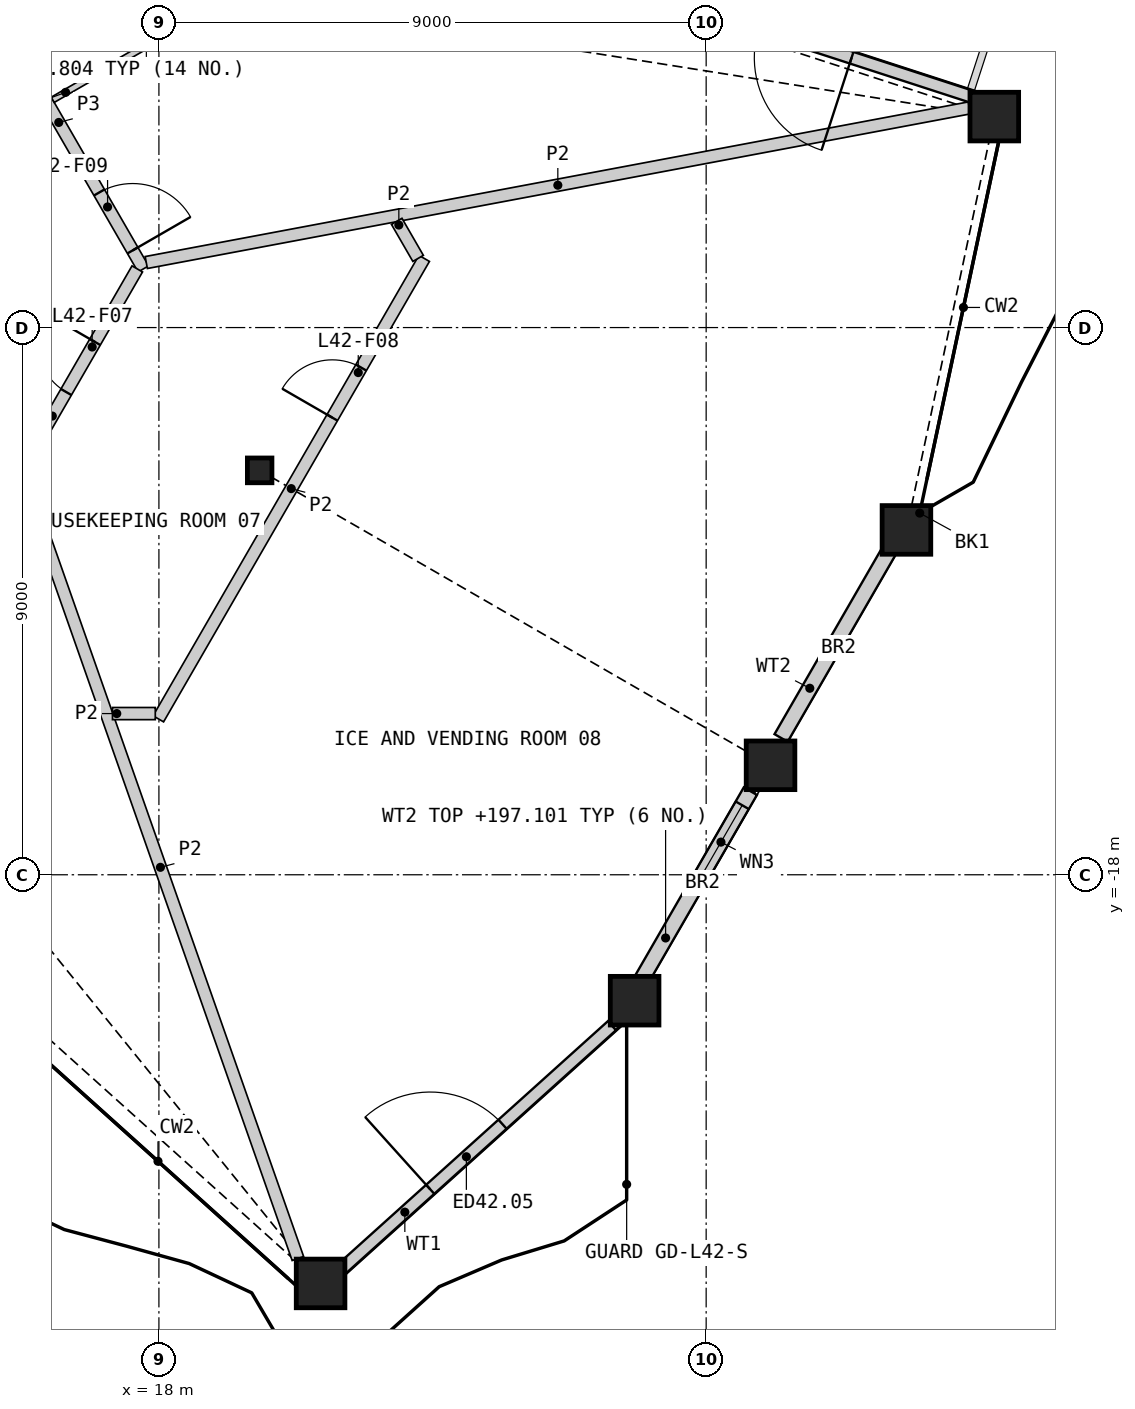
"""IFC4 building model, lengths in metres.
Left out: names, types, materials, properties, quantities, classifications, styles, units other than length and angle.
Written with IfcOpenShell. Run it as: python <this file> out.ifc"""

import sys

from ifc_helpers import new_model, si_unit, direction, frame, frame_2d, origin, origin_2d, place, context, subcontext, project, spatial, rectangle, hollow_rectangle, i_section, extrude, element, fill, save


model = new_model("IFC4")
c1 = context("Model", 3, precision=1e-05, world=origin(), true_north=direction((0.0, 1.0)))
c2 = subcontext(c1, "Body", "Model", "MODEL_VIEW")
j1 = project(units=[si_unit("LENGTHUNIT", "METRE"), si_unit("PLANEANGLEUNIT", "RADIAN")], contexts=[c1])
p1 = place(None, origin())
s1 = spatial("IfcSite", under=j1, at=p1, CompositionType="ELEMENT")
p2 = place(p1, origin())
s2 = spatial("IfcBuilding", under=s1, at=p2, CompositionType="ELEMENT")
p3 = place(p2, frame((0.0, 0.0, 194.4)))
s3 = spatial("IfcBuildingStorey", under=s2, at=p3, CompositionType="ELEMENT", Elevation=194.4)
for number, where, z_axis, x_axis in (
    (1, (20.659, -24.722, 0.0), (0.0, 0.0, 1.0), (1.0, 0.0, 0.0)),
    (2, (25.823, -20.071, 0.0), (0.0, 0.0, 1.0), (1.0, 0.0, 0.0)),
    (3, (28.059, -16.2, 0.0), (0.0, 0.0, 1.0), (1.0, 0.0, 0.0)),
    (4, (30.294, -12.328, 0.0), (0.0, 0.0, 1.0), (1.0, 0.0, 0.0)),
    (5, (31.739, -5.53, 0.0), (0.0, 0.0, 1.0), (1.0, 0.0, 0.0)),
):
    element("IfcColumn", number, at=place(p3, frame(where, z_axis=z_axis, x_axis=x_axis)), inside=s3, PredefinedType="COLUMN", context=c2, shape_type="SweptSolid", body=[
        extrude(hollow_rectangle(XDim=0.8, YDim=0.8, WallThickness=0.05, at=origin_2d()), origin(), (0.0, 0.0, 1.0), 3.6),
    ])
p4 = place(p3, frame((19.657, -11.349, 0.0), z_axis=(0.0, 0.0, 1.0), x_axis=(1.0, 0.0, 0.0)))
e6 = element("IfcColumn", 6, at=p4, inside=s3, PredefinedType="COLUMN", context=c2, shape_type="SweptSolid", body=[
    extrude(i_section(OverallWidth=0.404, OverallDepth=0.407, WebThickness=0.027, FlangeThickness=0.044, at=origin_2d()), origin(), (0.0, 0.0, 1.0), 3.6),
])
p5 = place(p3, frame((20.909, -24.571, 0.0), z_axis=(0.0, 0.0, 1.0), x_axis=(0.743153082589, 0.669121435794, 0.0)))
e7 = element("IfcWall", 7, at=p5, inside=s3, PredefinedType="SOLIDWALL", context=c2, shape_type="SweptSolid", body=[
    extrude(rectangle(XDim=6.111, YDim=0.2, at=frame_2d((3.055, 0.0))), origin(), (0.0, 0.0, 1.0), 2.701),
])
p6 = place(p5, frame((2.089, 0.0, 0.0)))
e8 = element("IfcOpeningElement", 8, at=p6, cuts=e7, PredefinedType="OPENING", context=c2, shape_type="SweptSolid", body=[
    extrude(rectangle(XDim=1.6, YDim=2.4, at=frame_2d((0.8, 1.2))), frame((0.0, 0.11, 0.0), z_axis=(0.0, -1.0, 0.0), x_axis=(1.0, 0.0, 0.0)), (0.0, 0.0, 1.0), 0.22),
])
p7 = place(p3, frame((25.868, -19.844, 0.0), z_axis=(0.0, 0.0, 1.0), x_axis=(0.499995303914, 0.866028115054, 0.0)))
e9 = element("IfcWall", 9, at=p7, inside=s3, PredefinedType="SOLIDWALL", context=c2, shape_type="SweptSolid", body=[
    extrude(rectangle(XDim=3.718, YDim=0.25, at=frame_2d((1.859, 0.0))), origin(), (0.0, 0.0, 1.0), 2.701),
])
p8 = place(p7, frame((2.05, 0.0, 1.7)))
e10 = element("IfcOpeningElement", 10, at=p8, cuts=e9, PredefinedType="OPENING", context=c2, shape_type="SweptSolid", body=[
    extrude(rectangle(XDim=1.4, YDim=0.8, at=frame_2d((0.7, 0.4))), frame((0.0, 0.135, 0.0), z_axis=(0.0, -1.0, 0.0), x_axis=(1.0, 0.0, 0.0)), (0.0, 0.0, 1.0), 0.27),
])
p9 = place(p3, frame((28.232, -15.75, 0.0), z_axis=(0.0, 0.0, 1.0), x_axis=(0.500034075199, 0.866005729565, 0.0)))
e11 = element("IfcWall", 11, at=p9, inside=s3, PredefinedType="SOLIDWALL", context=c2, shape_type="SweptSolid", body=[
    extrude(rectangle(XDim=3.775, YDim=0.25, at=frame_2d((1.888, 0.0))), origin(), (0.0, 0.0, 1.0), 2.701),
])
p10 = place(p3, frame((31.379, -5.207, 0.0), z_axis=(0.0, 0.0, 1.0), x_axis=(-0.951059550827, 0.30900765489, 0.0)))
e12 = element("IfcWall", 12, at=p10, inside=s3, PredefinedType="SOLIDWALL", context=c2, shape_type="SweptSolid", body=[
    extrude(rectangle(XDim=6.125, YDim=0.2, at=frame_2d((3.062, 0.0))), origin(), (0.0, 0.0, 1.0), 2.701),
])
p11 = place(p10, frame((2.089, 0.0, 0.0)))
e13 = element("IfcOpeningElement", 13, at=p11, cuts=e12, PredefinedType="OPENING", context=c2, shape_type="SweptSolid", body=[
    extrude(rectangle(XDim=1.6, YDim=2.4, at=frame_2d((0.8, 1.2))), frame((0.0, 0.11, 0.0), z_axis=(0.0, -1.0, 0.0), x_axis=(1.0, 0.0, 0.0)), (0.0, 0.0, 1.0), 0.22),
])
p12 = place(p3, frame((14.962, -3.217, 0.0), z_axis=(0.0, 0.0, 1.0), x_axis=(0.500013660489, -0.866017516754, 0.0)))
e14 = element("IfcWall", 14, at=p12, inside=s3, PredefinedType="PARTITIONING", context=c2, shape_type="SweptSolid", body=[
    extrude(rectangle(XDim=5.564, YDim=0.2, at=frame_2d((2.782, 0.0))), origin(), (0.0, 0.0, 1.0), 3.25),
])
p13 = place(p12, frame((4.112, 0.0, 0.0)))
e15 = element("IfcOpeningElement", 15, at=p13, cuts=e14, PredefinedType="OPENING", context=c2, shape_type="SweptSolid", body=[
    extrude(rectangle(XDim=1.1, YDim=2.1, at=frame_2d((0.55, 1.05))), frame((0.0, 0.11, 0.0), z_axis=(0.0, -1.0, 0.0), x_axis=(1.0, 0.0, 0.0)), (0.0, 0.0, 1.0), 0.22),
])
p14 = place(p3, frame((15.781, -11.262, 0.0), z_axis=(0.0, 0.0, 1.0), x_axis=(0.499958791762, 0.866049194065, 0.0)))
e16 = element("IfcWall", 16, at=p14, inside=s3, PredefinedType="PARTITIONING", context=c2, shape_type="SweptSolid", body=[
    extrude(rectangle(XDim=3.726, YDim=0.2, at=frame_2d((1.863, 0.0))), origin(), (0.0, 0.0, 1.0), 3.25),
])
p15 = place(p14, frame((1.388, 0.0, 0.0)))
e17 = element("IfcOpeningElement", 17, at=p15, cuts=e16, PredefinedType="OPENING", context=c2, shape_type="SweptSolid", body=[
    extrude(rectangle(XDim=0.95, YDim=2.1, at=frame_2d((0.475, 1.05))), frame((0.0, 0.11, 0.0), z_axis=(0.0, -1.0, 0.0), x_axis=(1.0, 0.0, 0.0)), (0.0, 0.0, 1.0), 0.22),
])
p16 = place(p3, frame((17.792, -7.93, 0.0), z_axis=(0.0, 0.0, 1.0), x_axis=(0.982805703999, 0.184642758284, 0.0)))
e18 = element("IfcWall", 18, at=p16, inside=s3, PredefinedType="PARTITIONING", context=c2, shape_type="SweptSolid", body=[
    extrude(rectangle(XDim=13.774, YDim=0.2, at=frame_2d((6.887, 0.0))), origin(), (0.0, 0.0, 1.0), 2.404),
])
p17 = place(p3, frame((15.764, -11.443, 0.0), z_axis=(0.0, 0.0, 1.0), x_axis=(0.331517429591, -0.943449094481, 0.0)))
e19 = element("IfcWall", 19, at=p17, inside=s3, PredefinedType="PARTITIONING", context=c2, shape_type="SweptSolid", body=[
    extrude(rectangle(XDim=13.639, YDim=0.2, at=frame_2d((6.82, 0.0))), origin(), (0.0, 0.0, 1.0), 2.404),
])
p18 = place(p3, frame((17.99, -15.436, 0.0), z_axis=(0.0, 0.0, 1.0), x_axis=(0.500012451049, 0.866018215049, 0.0)))
e20 = element("IfcWall", 20, at=p18, inside=s3, PredefinedType="PARTITIONING", context=c2, shape_type="SweptSolid", body=[
    extrude(rectangle(XDim=8.745, YDim=0.2, at=frame_2d((4.373, 0.0))), origin(), (0.0, 0.0, 1.0), 2.404),
])
p19 = place(p18, frame((5.721, 0.0, 0.0)))
e21 = element("IfcOpeningElement", 21, at=p19, cuts=e20, PredefinedType="OPENING", context=c2, shape_type="SweptSolid", body=[
    extrude(rectangle(XDim=0.95, YDim=2.1, at=frame_2d((0.475, 1.05))), frame((0.0, 0.11, 0.0), z_axis=(0.0, -1.0, 0.0), x_axis=(1.0, 0.0, 0.0)), (0.0, 0.0, 1.0), 0.22),
])
for number, where, z_axis, x_axis in (
    (22, (17.236, -15.349, 0.0), (0.0, 0.0, 1.0), (1.0, 0.0, 0.0)),
    (23, (21.911, -7.253, 0.0), (0.0, 0.0, 1.0), (0.5, -0.866, 0.0)),
):
    element("IfcWall", number, at=place(p3, frame(where, z_axis=z_axis, x_axis=x_axis)), inside=s3, PredefinedType="PARTITIONING", context=c2, shape_type="SweptSolid", body=[
        extrude(rectangle(XDim=0.704, YDim=0.2, at=frame_2d((0.352, 0.0))), origin(), (0.0, 0.0, 1.0), 2.404),
    ])
p20 = place(p3, frame((16.254, -5.254, 0.0), z_axis=(0.0, 0.0, 1.0), x_axis=(0.866032905446, 0.499987006516, 0.0)))
e24 = element("IfcWall", 24, at=p20, inside=s3, PredefinedType="PARTITIONING", context=c2, shape_type="SweptSolid", body=[
    extrude(rectangle(XDim=2.45, YDim=0.1, at=frame_2d((1.225, 0.0))), origin(), (0.0, 0.0, 1.0), 2.404),
])
p21 = place(p6, origin())
e25 = element("IfcDoor", 25, at=p21, inside=s3, OperationType="DOUBLE_DOOR_SINGLE_SWING", PredefinedType="DOOR", context=c2, shape_type="SweptSolid", body=[
    extrude(rectangle(XDim=1.6, YDim=2.4, at=frame_2d((0.8, 1.2))), frame((0.0, 0.025, 0.0), z_axis=(0.0, -1.0, 0.0), x_axis=(1.0, 0.0, 0.0)), (0.0, 0.0, 1.0), 0.05),
])
fill(e8, e25)
p22 = place(p8, origin())
e26 = element("IfcWindow", 26, at=p22, inside=s3, PartitioningType="SINGLE_PANEL", PredefinedType="WINDOW", context=c2, shape_type="SweptSolid", body=[
    extrude(rectangle(XDim=1.4, YDim=0.8, at=frame_2d((0.7, 0.4))), frame((0.0, 0.03, 0.0), z_axis=(0.0, -1.0, 0.0), x_axis=(1.0, 0.0, 0.0)), (0.0, 0.0, 1.0), 0.06),
])
fill(e10, e26)
p23 = place(p11, origin())
e27 = element("IfcDoor", 27, at=p23, inside=s3, OperationType="DOUBLE_DOOR_SINGLE_SWING", PredefinedType="DOOR", context=c2, shape_type="SweptSolid", body=[
    extrude(rectangle(XDim=1.6, YDim=2.4, at=frame_2d((0.8, 1.2))), frame((0.0, 0.025, 0.0), z_axis=(0.0, -1.0, 0.0), x_axis=(1.0, 0.0, 0.0)), (0.0, 0.0, 1.0), 0.05),
])
fill(e13, e27)
p24 = place(p15, origin())
e28 = element("IfcDoor", 28, at=p24, inside=s3, OperationType="SINGLE_SWING_RIGHT", PredefinedType="DOOR", context=c2, shape_type="SweptSolid", body=[
    extrude(rectangle(XDim=0.95, YDim=2.1, at=frame_2d((0.475, 1.05))), frame((0.0, 0.025, 0.0), z_axis=(0.0, -1.0, 0.0), x_axis=(1.0, 0.0, 0.0)), (0.0, 0.0, 1.0), 0.05),
])
fill(e17, e28)
p25 = place(p19, origin())
e29 = element("IfcDoor", 29, at=p25, inside=s3, OperationType="SINGLE_SWING_LEFT", PredefinedType="DOOR", context=c2, shape_type="SweptSolid", body=[
    extrude(rectangle(XDim=0.95, YDim=2.1, at=frame_2d((0.475, 1.05))), frame((0.0, 0.025, 0.0), z_axis=(0.0, -1.0, 0.0), x_axis=(1.0, 0.0, 0.0)), (0.0, 0.0, 1.0), 0.05),
])
fill(e21, e29)
p26 = place(p13, origin())
e30 = element("IfcDoor", 30, at=p26, inside=s3, OperationType="SINGLE_SWING_RIGHT", PredefinedType="DOOR", context=c2, shape_type="SweptSolid", body=[
    extrude(rectangle(XDim=1.1, YDim=2.1, at=frame_2d((0.55, 1.05))), frame((0.0, 0.025, 0.0), z_axis=(0.0, -1.0, 0.0), x_axis=(1.0, 0.0, 0.0)), (0.0, 0.0, 1.0), 0.05),
])
fill(e15, e30)
save(model, sys.argv[1])
